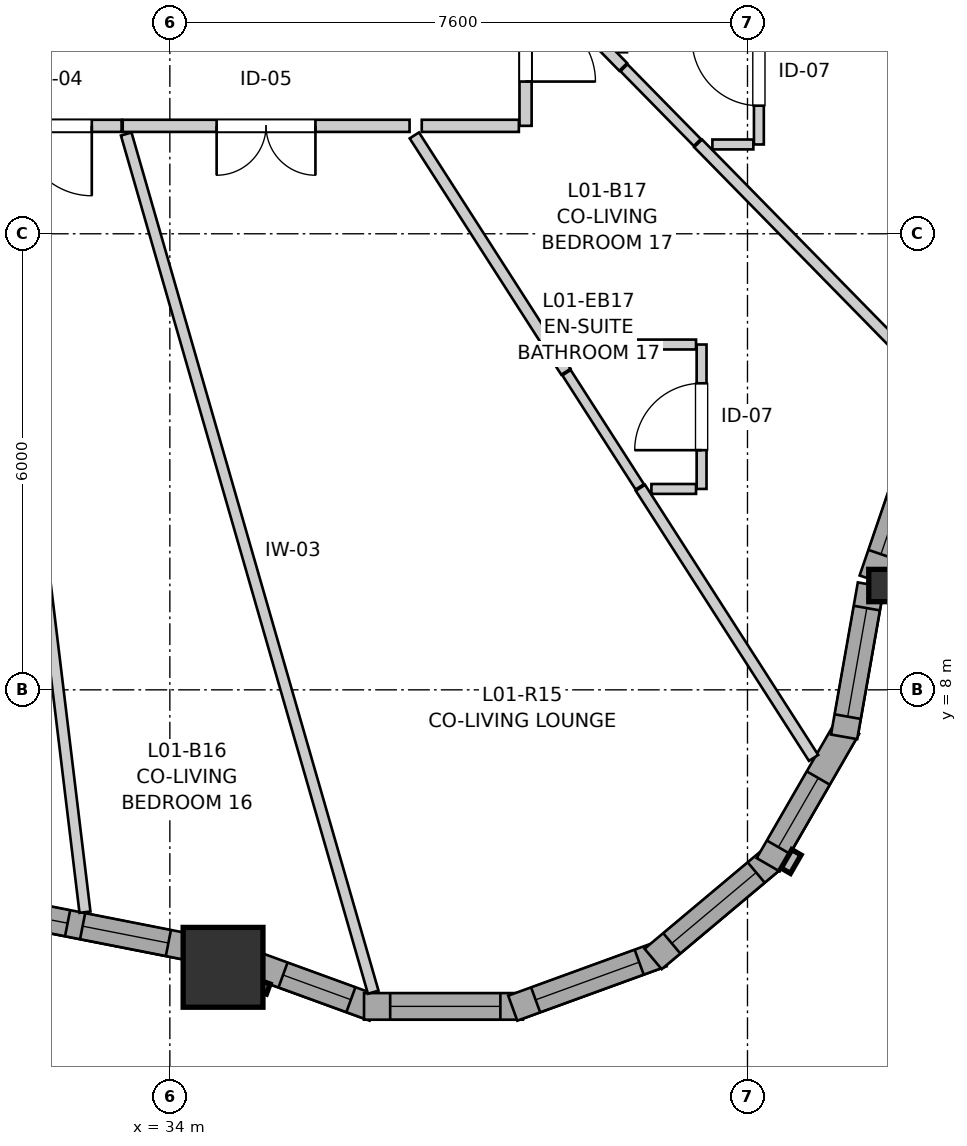
"""IFC4 building model, lengths in metres.
Left out: names, types, materials, properties, quantities, classifications, styles, units other than length and angle.
Written with IfcOpenShell. Run it as: python <this file> out.ifc"""

import sys

from ifc_helpers import new_model, si_unit, direction, frame, frame_2d, origin, origin_2d, place, context, subcontext, project, spatial, rectangle, i_section, extrude, source, transform, mapped, element, fill, save


model = new_model("IFC4")
c1 = context("Model", 3, precision=1e-05, world=origin(), true_north=direction((0.0, 1.0)))
c2 = subcontext(c1, "Body", "Model", "MODEL_VIEW")
j1 = project(units=[si_unit("LENGTHUNIT", "METRE"), si_unit("PLANEANGLEUNIT", "RADIAN")], contexts=[c1])
p1 = place(None, origin())
s1 = spatial("IfcSite", under=j1, at=p1, CompositionType="ELEMENT")
p2 = place(p1, origin())
s2 = spatial("IfcBuilding", under=s1, at=p2, CompositionType="ELEMENT")
p3 = place(p2, frame((0.0, 0.0, 7.8)))
s3 = spatial("IfcBuildingStorey", under=s2, at=p3, CompositionType="ELEMENT", Elevation=7.8)
m1 = source(origin(), c2, "Body", "SweptSolid", [
    extrude(rectangle(XDim=1.05, YDim=1.05, at=origin_2d()), origin(), (0.0, 0.0, 1.0), 2.94),
])
p4 = place(p3, frame((34.7, 4.349, 0.0), z_axis=(0.0, 0.0, 1.0), x_axis=(1.0, 0.0, 0.0)))
e1 = element("IfcColumn", 1, at=p4, inside=s3, PredefinedType="COLUMN", context=c2, shape_type="MappedRepresentation", body=[
    mapped(m1, transform((0.0, 0.0, 0.0), x_axis=(1.0, 0.0, 0.0), y_axis=(0.0, 1.0, 0.0), z_axis=(0.0, 0.0, 1.0), scale=1.0)),
])
m2 = source(origin(), c2, "Body", "SweptSolid", [
    extrude(i_section(OverallWidth=0.409, OverallDepth=0.425, WebThickness=0.03, FlangeThickness=0.048, FilletRadius=0.015, at=origin_2d()), origin(), (0.0, 0.0, 1.0), 2.94),
])
p5 = place(p3, frame((43.4, 9.372, 0.0), z_axis=(0.0, 0.0, 1.0), x_axis=(1.0, 0.0, 0.0)))
e2 = element("IfcColumn", 2, at=p5, inside=s3, PredefinedType="PILASTER", context=c2, shape_type="MappedRepresentation", body=[
    mapped(m2, transform((0.0, 0.0, 0.0), x_axis=(1.0, 0.0, 0.0), y_axis=(0.0, 1.0, 0.0), z_axis=(0.0, 0.0, 1.0), scale=1.0)),
])
p6 = place(p3, frame((31.248, 5.206, 0.0), z_axis=(0.0, 0.0, 1.0), x_axis=(0.981233354077, -0.192824025597, 0.0)))
e3 = element("IfcWall", 3, at=p6, inside=s3, PredefinedType="SOLIDWALL", context=c2, shape_type="SweptSolid", body=[
    extrude(rectangle(XDim=3.253, YDim=0.35, at=frame_2d((1.626, 0.0))), origin(), (0.0, 0.0, 1.0), 2.42),
])
p7 = place(p6, frame((0.284, 0.0, 0.82)))
e4 = element("IfcOpeningElement", 4, at=p7, cuts=e3, PredefinedType="OPENING", context=c2, shape_type="SweptSolid", body=[
    extrude(rectangle(XDim=1.15, YDim=1.2, at=frame_2d((0.575, 0.6))), frame((0.0, 0.185, 0.0), z_axis=(0.0, -1.0, 0.0), x_axis=(1.0, 0.0, 0.0)), (0.0, 0.0, 1.0), 0.37),
])
p8 = place(p6, frame((1.635, 0.0, 0.82)))
e5 = element("IfcOpeningElement", 5, at=p8, cuts=e3, PredefinedType="OPENING", context=c2, shape_type="SweptSolid", body=[
    extrude(rectangle(XDim=1.15, YDim=1.2, at=frame_2d((0.575, 0.6))), frame((0.0, 0.185, 0.0), z_axis=(0.0, -1.0, 0.0), x_axis=(1.0, 0.0, 0.0)), (0.0, 0.0, 1.0), 0.37),
])
p9 = place(p3, frame((35.042, 4.411, 0.0), z_axis=(0.0, 0.0, 1.0), x_axis=(0.9396916908, -0.34202269843, 0.0)))
e6 = element("IfcWall", 6, at=p9, inside=s3, PredefinedType="SOLIDWALL", context=c2, shape_type="SweptSolid", body=[
    extrude(rectangle(XDim=1.752, YDim=0.35, at=frame_2d((0.876, 0.0))), origin(), (0.0, 0.0, 1.0), 2.42),
])
p10 = place(p9, frame((0.476, 0.0, 0.82)))
e7 = element("IfcOpeningElement", 7, at=p10, cuts=e6, PredefinedType="OPENING", context=c2, shape_type="SweptSolid", body=[
    extrude(rectangle(XDim=0.95, YDim=1.35, at=frame_2d((0.475, 0.675))), frame((0.0, 0.185, 0.0), z_axis=(0.0, -1.0, 0.0), x_axis=(1.0, 0.0, 0.0)), (0.0, 0.0, 1.0), 0.37),
])
p11 = place(p3, frame((36.555, 3.835, 0.0), z_axis=(0.0, 0.0, 1.0), x_axis=(1.0, 0.0, 0.0)))
e8 = element("IfcWall", 8, at=p11, inside=s3, PredefinedType="SOLIDWALL", context=c2, shape_type="SweptSolid", body=[
    extrude(rectangle(XDim=2.091, YDim=0.35, at=frame_2d((1.045, 0.0))), origin(), (0.0, 0.0, 1.0), 2.42),
])
p12 = place(p11, frame((0.344, 0.0, 0.82)))
e9 = element("IfcOpeningElement", 9, at=p12, cuts=e8, PredefinedType="OPENING", context=c2, shape_type="SweptSolid", body=[
    extrude(rectangle(XDim=1.45, YDim=1.25, at=frame_2d((0.725, 0.625))), frame((0.0, 0.185, 0.0), z_axis=(0.0, -1.0, 0.0), x_axis=(1.0, 0.0, 0.0)), (0.0, 0.0, 1.0), 0.37),
])
p13 = place(p3, frame((38.512, 3.812, 0.0), z_axis=(0.0, 0.0, 1.0), x_axis=(0.939660353162, 0.342108784886, 0.0)))
e10 = element("IfcWall", 10, at=p13, inside=s3, PredefinedType="SOLIDWALL", context=c2, shape_type="SweptSolid", body=[
    extrude(rectangle(XDim=2.09, YDim=0.35, at=frame_2d((1.045, 0.0))), origin(), (0.0, 0.0, 1.0), 2.42),
])
p14 = place(p13, frame((0.32, 0.0, 0.82)))
e11 = element("IfcOpeningElement", 11, at=p14, cuts=e10, PredefinedType="OPENING", context=c2, shape_type="SweptSolid", body=[
    extrude(rectangle(XDim=1.45, YDim=1.25, at=frame_2d((0.725, 0.625))), frame((0.0, 0.185, 0.0), z_axis=(0.0, -1.0, 0.0), x_axis=(1.0, 0.0, 0.0)), (0.0, 0.0, 1.0), 0.37),
])
p15 = place(p3, frame((40.358, 4.459, 0.0), z_axis=(0.0, 0.0, 1.0), x_axis=(0.766082082368, 0.642742750308, 0.0)))
e12 = element("IfcWall", 12, at=p15, inside=s3, PredefinedType="SOLIDWALL", context=c2, shape_type="SweptSolid", body=[
    extrude(rectangle(XDim=2.09, YDim=0.35, at=frame_2d((1.045, 0.0))), origin(), (0.0, 0.0, 1.0), 2.42),
])
p16 = place(p15, frame((0.32, 0.0, 0.82)))
e13 = element("IfcOpeningElement", 13, at=p16, cuts=e12, PredefinedType="OPENING", context=c2, shape_type="SweptSolid", body=[
    extrude(rectangle(XDim=1.45, YDim=1.25, at=frame_2d((0.725, 0.625))), frame((0.0, 0.185, 0.0), z_axis=(0.0, -1.0, 0.0), x_axis=(1.0, 0.0, 0.0)), (0.0, 0.0, 1.0), 0.37),
])
p17 = place(p3, frame((41.873, 5.699, 0.0), z_axis=(0.0, 0.0, 1.0), x_axis=(0.49990781971, 0.866078617559, 0.0)))
e14 = element("IfcWall", 14, at=p17, inside=s3, PredefinedType="SOLIDWALL", context=c2, shape_type="SweptSolid", body=[
    extrude(rectangle(XDim=2.09, YDim=0.35, at=frame_2d((1.045, 0.0))), origin(), (0.0, 0.0, 1.0), 2.42),
])
p18 = place(p17, frame((0.268, 0.0, 0.82)))
e15 = element("IfcOpeningElement", 15, at=p18, cuts=e14, PredefinedType="OPENING", context=c2, shape_type="SweptSolid", body=[
    extrude(rectangle(XDim=1.05, YDim=1.45, at=frame_2d((0.525, 0.725))), frame((0.0, 0.185, 0.0), z_axis=(0.0, -1.0, 0.0), x_axis=(1.0, 0.0, 0.0)), (0.0, 0.0, 1.0), 0.37),
])
p19 = place(p3, frame((42.871, 7.382, 0.0), z_axis=(0.0, 0.0, 1.0), x_axis=(0.173586593252, 0.984818610021, 0.0)))
e16 = element("IfcWall", 16, at=p19, inside=s3, PredefinedType="SOLIDWALL", context=c2, shape_type="SweptSolid", body=[
    extrude(rectangle(XDim=2.032, YDim=0.35, at=frame_2d((1.016, 0.0))), origin(), (0.0, 0.0, 1.0), 2.42),
])
p20 = place(p19, frame((0.27, 0.0, 0.82)))
e17 = element("IfcOpeningElement", 17, at=p20, cuts=e16, PredefinedType="OPENING", context=c2, shape_type="SweptSolid", body=[
    extrude(rectangle(XDim=1.45, YDim=1.25, at=frame_2d((0.725, 0.625))), frame((0.0, 0.185, 0.0), z_axis=(0.0, -1.0, 0.0), x_axis=(1.0, 0.0, 0.0)), (0.0, 0.0, 1.0), 0.37),
])
p21 = place(p3, frame((43.241, 9.448, 0.0), z_axis=(0.0, 0.0, 1.0), x_axis=(0.323599751171, 0.946194060984, 0.0)))
e18 = element("IfcWall", 18, at=p21, inside=s3, PredefinedType="SOLIDWALL", context=c2, shape_type="SweptSolid", body=[
    extrude(rectangle(XDim=3.532, YDim=0.35, at=frame_2d((1.766, 0.0))), origin(), (0.0, 0.0, 1.0), 2.42),
])
p22 = place(p21, frame((0.356, 0.0, 0.82)))
e19 = element("IfcOpeningElement", 19, at=p22, cuts=e18, PredefinedType="OPENING", context=c2, shape_type="SweptSolid", body=[
    extrude(rectangle(XDim=2.1, YDim=1.4, at=frame_2d((1.05, 0.7))), frame((0.0, 0.185, 0.0), z_axis=(0.0, -1.0, 0.0), x_axis=(1.0, 0.0, 0.0)), (0.0, 0.0, 1.0), 0.37),
])
p23 = place(p3, frame((37.154, 15.42, 0.0), z_axis=(0.0, 0.0, 1.0), x_axis=(-1.0, 0.0, 0.0)))
e20 = element("IfcWall", 20, at=p23, inside=s3, PredefinedType="PARTITIONING", context=c2, shape_type="SweptSolid", body=[
    extrude(rectangle(XDim=3.774, YDim=0.16, at=frame_2d((1.887, 0.0))), origin(), (0.0, 0.0, 1.0), 2.94),
])
p24 = place(p23, frame((1.239, 0.0, 0.0)))
e21 = element("IfcOpeningElement", 21, at=p24, cuts=e20, PredefinedType="OPENING", context=c2, shape_type="SweptSolid", body=[
    extrude(rectangle(XDim=1.3, YDim=2.1, at=frame_2d((0.65, 1.05))), frame((0.0, 0.09, 0.0), z_axis=(0.0, -1.0, 0.0), x_axis=(1.0, 0.0, 0.0)), (0.0, 0.0, 1.0), 0.18),
])
p25 = place(p3, frame((38.68, 17.469, 0.0), z_axis=(0.0, 0.0, 1.0), x_axis=(0.0, -1.0, 0.0)))
e22 = element("IfcWall", 22, at=p25, inside=s3, PredefinedType="PARTITIONING", context=c2, shape_type="SweptSolid", body=[
    extrude(rectangle(XDim=2.049, YDim=0.16, at=frame_2d((1.024, 0.0))), origin(), (0.0, 0.0, 1.0), 2.94),
])
p26 = place(p25, frame((0.546, 0.0, 0.0)))
e23 = element("IfcOpeningElement", 23, at=p26, cuts=e22, PredefinedType="OPENING", context=c2, shape_type="SweptSolid", body=[
    extrude(rectangle(XDim=0.92, YDim=2.1, at=frame_2d((0.46, 1.05))), frame((0.0, 0.09, 0.0), z_axis=(0.0, -1.0, 0.0), x_axis=(1.0, 0.0, 0.0)), (0.0, 0.0, 1.0), 0.18),
])
p27 = place(p3, frame((40.996, 10.643, 0.0), z_axis=(0.0, 0.0, 1.0), x_axis=(0.0, 1.0, 0.0)))
e24 = element("IfcWall", 24, at=p27, inside=s3, PredefinedType="PARTITIONING", context=c2, shape_type="SweptSolid", body=[
    extrude(rectangle(XDim=1.9, YDim=0.13, at=frame_2d((0.95, 0.0))), origin(), (0.0, 0.0, 1.0), 2.94),
])
p28 = place(p27, frame((0.51, 0.0, 0.0)))
e25 = element("IfcOpeningElement", 25, at=p28, cuts=e24, PredefinedType="OPENING", context=c2, shape_type="SweptSolid", body=[
    extrude(rectangle(XDim=0.88, YDim=2.05, at=frame_2d((0.44, 1.025))), frame((0.0, 0.075, 0.0), z_axis=(0.0, -1.0, 0.0), x_axis=(1.0, 0.0, 0.0)), (0.0, 0.0, 1.0), 0.15),
])
p29 = place(p3, frame((41.75, 15.175, 0.0), z_axis=(0.0, 0.0, 1.0), x_axis=(0.0, 1.0, 0.0)))
e26 = element("IfcWall", 26, at=p29, inside=s3, PredefinedType="PARTITIONING", context=c2, shape_type="SweptSolid", body=[
    extrude(rectangle(XDim=1.9, YDim=0.13, at=frame_2d((0.95, 0.0))), origin(), (0.0, 0.0, 1.0), 2.94),
])
p30 = place(p29, frame((0.51, 0.0, 0.0)))
e27 = element("IfcOpeningElement", 27, at=p30, cuts=e26, PredefinedType="OPENING", context=c2, shape_type="SweptSolid", body=[
    extrude(rectangle(XDim=0.88, YDim=2.05, at=frame_2d((0.44, 1.025))), frame((0.0, 0.075, 0.0), z_axis=(0.0, -1.0, 0.0), x_axis=(1.0, 0.0, 0.0)), (0.0, 0.0, 1.0), 0.15),
])
p31 = place(p3, frame((33.365, 15.42, 0.0), z_axis=(0.0, 0.0, 1.0), x_axis=(-1.0, 0.0, 0.0)))
e28 = element("IfcWall", 28, at=p31, inside=s3, PredefinedType="PARTITIONING", context=c2, shape_type="SweptSolid", body=[
    extrude(rectangle(XDim=1.704, YDim=0.16, at=frame_2d((0.852, 0.0))), origin(), (0.0, 0.0, 1.0), 2.94),
])
p32 = place(p31, frame((0.392, 0.0, 0.0)))
e29 = element("IfcOpeningElement", 29, at=p32, cuts=e28, PredefinedType="OPENING", context=c2, shape_type="SweptSolid", body=[
    extrude(rectangle(XDim=0.92, YDim=2.1, at=frame_2d((0.46, 1.05))), frame((0.0, 0.09, 0.0), z_axis=(0.0, -1.0, 0.0), x_axis=(1.0, 0.0, 0.0)), (0.0, 0.0, 1.0), 0.18),
])
p33 = place(p3, frame((33.426, 15.312, 0.0), z_axis=(0.0, 0.0, 1.0), x_axis=(0.276606114731, -0.960983380342, 0.0)))
e30 = element("IfcWall", 30, at=p33, inside=s3, PredefinedType="PARTITIONING", context=c2, shape_type="SweptSolid", body=[
    extrude(rectangle(XDim=11.749, YDim=0.145, at=frame_2d((5.875, 0.0))), origin(), (0.0, 0.0, 1.0), 2.94),
])
p34 = place(p3, frame((31.643, 15.323, 0.0), z_axis=(0.0, 0.0, 1.0), x_axis=(0.120185874717, -0.992751406707, 0.0)))
e31 = element("IfcWall", 31, at=p34, inside=s3, PredefinedType="PARTITIONING", context=c2, shape_type="SweptSolid", body=[
    extrude(rectangle(XDim=10.323, YDim=0.145, at=frame_2d((5.162, 0.0))), origin(), (0.0, 0.0, 1.0), 2.94),
])
p35 = place(p3, frame((40.95, 15.19, 0.0), z_axis=(0.0, 0.0, 1.0), x_axis=(0.700142401903, -0.714003233226, 0.0)))
e32 = element("IfcWall", 32, at=p35, inside=s3, PredefinedType="PARTITIONING", context=c2, shape_type="SweptSolid", body=[
    extrude(rectangle(XDim=4.298, YDim=0.145, at=frame_2d((2.149, 0.0))), origin(), (0.0, 0.0, 1.0), 2.94),
])
p36 = place(p3, frame((40.191, 10.658, 0.0), z_axis=(0.0, 0.0, 1.0), x_axis=(0.539757550566, -0.841820519236, 0.0)))
e33 = element("IfcWall", 33, at=p36, inside=s3, PredefinedType="PARTITIONING", context=c2, shape_type="SweptSolid", body=[
    extrude(rectangle(XDim=4.221, YDim=0.145, at=frame_2d((2.111, 0.0))), origin(), (0.0, 0.0, 1.0), 2.94),
])
p37 = place(p3, frame((37.217, 15.294, 0.0), z_axis=(0.0, 0.0, 1.0), x_axis=(0.539878709929, -0.841742822105, 0.0)))
e34 = element("IfcWall", 34, at=p37, inside=s3, PredefinedType="PARTITIONING", context=c2, shape_type="SweptSolid", body=[
    extrude(rectangle(XDim=3.694, YDim=0.145, at=frame_2d((1.847, 0.0))), origin(), (0.0, 0.0, 1.0), 2.94),
])
p38 = place(p3, frame((38.817, 17.365, 0.0), z_axis=(0.0, 0.0, 1.0), x_axis=(0.70029627305, -0.713852316626, 0.0)))
e35 = element("IfcWall", 35, at=p38, inside=s3, PredefinedType="PARTITIONING", context=c2, shape_type="SweptSolid", body=[
    extrude(rectangle(XDim=1.639, YDim=0.145, at=frame_2d((0.819, 0.0))), origin(), (0.0, 0.0, 1.0), 2.94),
])
p39 = place(p3, frame((39.196, 12.543, 0.0), z_axis=(0.0, 0.0, 1.0), x_axis=(1.0, 0.0, 0.0)))
e36 = element("IfcWall", 36, at=p39, inside=s3, PredefinedType="PARTITIONING", context=c2, shape_type="SweptSolid", body=[
    extrude(rectangle(XDim=1.727, YDim=0.13, at=frame_2d((0.864, 0.0))), origin(), (0.0, 0.0, 1.0), 2.94),
])
p40 = place(p3, frame((39.219, 12.172, 0.0), z_axis=(0.0, 0.0, 1.0), x_axis=(0.539899826285, -0.84172927808, 0.0)))
e37 = element("IfcWall", 37, at=p40, inside=s3, PredefinedType="PARTITIONING", context=c2, shape_type="SweptSolid", body=[
    extrude(rectangle(XDim=1.784, YDim=0.13, at=frame_2d((0.892, 0.0))), origin(), (0.0, 0.0, 1.0), 2.94),
])
p41 = place(p3, frame((37.314, 15.42, 0.0), z_axis=(0.0, 0.0, 1.0), x_axis=(1.0, 0.0, 0.0)))
e38 = element("IfcWall", 38, at=p41, inside=s3, PredefinedType="PARTITIONING", context=c2, shape_type="SweptSolid", body=[
    extrude(rectangle(XDim=1.278, YDim=0.16, at=frame_2d((0.639, 0.0))), origin(), (0.0, 0.0, 1.0), 2.94),
])
p42 = place(p3, frame((39.975, 16.184, 0.0), z_axis=(0.0, 0.0, 1.0), x_axis=(0.700338966049, -0.713810431861, 0.0)))
e39 = element("IfcWall", 39, at=p42, inside=s3, PredefinedType="PARTITIONING", context=c2, shape_type="SweptSolid", body=[
    extrude(rectangle(XDim=1.377, YDim=0.13, at=frame_2d((0.689, 0.0))), origin(), (0.0, 0.0, 1.0), 2.94),
])
p43 = place(p3, frame((40.336, 10.643, 0.0), z_axis=(0.0, 0.0, 1.0), x_axis=(1.0, 0.0, 0.0)))
e40 = element("IfcWall", 40, at=p43, inside=s3, PredefinedType="PARTITIONING", context=c2, shape_type="SweptSolid", body=[
    extrude(rectangle(XDim=0.587, YDim=0.13, at=frame_2d((0.294, 0.0))), origin(), (0.0, 0.0, 1.0), 2.94),
])
p44 = place(p3, frame((41.138, 15.175, 0.0), z_axis=(0.0, 0.0, 1.0), x_axis=(1.0, 0.0, 0.0)))
e41 = element("IfcWall", 41, at=p44, inside=s3, PredefinedType="PARTITIONING", context=c2, shape_type="SweptSolid", body=[
    extrude(rectangle(XDim=0.539, YDim=0.13, at=frame_2d((0.27, 0.0))), origin(), (0.0, 0.0, 1.0), 2.94),
])
m3 = source(origin(), c2, "Body", "SweptSolid", [
    extrude(rectangle(XDim=1.15, YDim=1.2, at=frame_2d((0.575, 0.6))), frame((0.0, 0.03, 0.0), z_axis=(0.0, -1.0, 0.0), x_axis=(1.0, 0.0, 0.0)), (0.0, 0.0, 1.0), 0.06),
])
p45 = place(p7, origin())
e42 = element("IfcWindow", 42, at=p45, inside=s3, PartitioningType="SINGLE_PANEL", PredefinedType="WINDOW", context=c2, shape_type="MappedRepresentation", body=[
    mapped(m3, transform((0.0, 0.0, 0.0), x_axis=(1.0, 0.0, 0.0), y_axis=(0.0, 1.0, 0.0), z_axis=(0.0, 0.0, 1.0), scale=1.0)),
])
fill(e4, e42)
p46 = place(p8, origin())
e43 = element("IfcWindow", 43, at=p46, inside=s3, PartitioningType="SINGLE_PANEL", PredefinedType="WINDOW", context=c2, shape_type="MappedRepresentation", body=[
    mapped(m3, transform((0.0, 0.0, 0.0), x_axis=(1.0, 0.0, 0.0), y_axis=(0.0, 1.0, 0.0), z_axis=(0.0, 0.0, 1.0), scale=1.0)),
])
fill(e5, e43)
m4 = source(origin(), c2, "Body", "SweptSolid", [
    extrude(rectangle(XDim=0.95, YDim=1.35, at=frame_2d((0.475, 0.675))), frame((0.0, 0.03, 0.0), z_axis=(0.0, -1.0, 0.0), x_axis=(1.0, 0.0, 0.0)), (0.0, 0.0, 1.0), 0.06),
])
p47 = place(p10, origin())
e44 = element("IfcWindow", 44, at=p47, inside=s3, PartitioningType="SINGLE_PANEL", PredefinedType="WINDOW", context=c2, shape_type="MappedRepresentation", body=[
    mapped(m4, transform((0.0, 0.0, 0.0), x_axis=(1.0, 0.0, 0.0), y_axis=(0.0, 1.0, 0.0), z_axis=(0.0, 0.0, 1.0), scale=1.0)),
])
fill(e7, e44)
m5 = source(origin(), c2, "Body", "SweptSolid", [
    extrude(rectangle(XDim=1.45, YDim=1.25, at=frame_2d((0.725, 0.625))), frame((0.0, 0.03, 0.0), z_axis=(0.0, -1.0, 0.0), x_axis=(1.0, 0.0, 0.0)), (0.0, 0.0, 1.0), 0.06),
])
p48 = place(p12, origin())
e45 = element("IfcWindow", 45, at=p48, inside=s3, PartitioningType="SINGLE_PANEL", PredefinedType="WINDOW", context=c2, shape_type="MappedRepresentation", body=[
    mapped(m5, transform((0.0, 0.0, 0.0), x_axis=(1.0, 0.0, 0.0), y_axis=(0.0, 1.0, 0.0), z_axis=(0.0, 0.0, 1.0), scale=1.0)),
])
fill(e9, e45)
p49 = place(p14, origin())
e46 = element("IfcWindow", 46, at=p49, inside=s3, PartitioningType="SINGLE_PANEL", PredefinedType="WINDOW", context=c2, shape_type="MappedRepresentation", body=[
    mapped(m5, transform((0.0, 0.0, 0.0), x_axis=(1.0, 0.0, 0.0), y_axis=(0.0, 1.0, 0.0), z_axis=(0.0, 0.0, 1.0), scale=1.0)),
])
fill(e11, e46)
p50 = place(p16, origin())
e47 = element("IfcWindow", 47, at=p50, inside=s3, PartitioningType="SINGLE_PANEL", PredefinedType="WINDOW", context=c2, shape_type="MappedRepresentation", body=[
    mapped(m5, transform((0.0, 0.0, 0.0), x_axis=(1.0, 0.0, 0.0), y_axis=(0.0, 1.0, 0.0), z_axis=(0.0, 0.0, 1.0), scale=1.0)),
])
fill(e13, e47)
m6 = source(origin(), c2, "Body", "SweptSolid", [
    extrude(rectangle(XDim=1.05, YDim=1.45, at=frame_2d((0.525, 0.725))), frame((0.0, 0.03, 0.0), z_axis=(0.0, -1.0, 0.0), x_axis=(1.0, 0.0, 0.0)), (0.0, 0.0, 1.0), 0.06),
])
p51 = place(p18, origin())
e48 = element("IfcWindow", 48, at=p51, inside=s3, PartitioningType="SINGLE_PANEL", PredefinedType="WINDOW", context=c2, shape_type="MappedRepresentation", body=[
    mapped(m6, transform((0.0, 0.0, 0.0), x_axis=(1.0, 0.0, 0.0), y_axis=(0.0, 1.0, 0.0), z_axis=(0.0, 0.0, 1.0), scale=1.0)),
])
fill(e15, e48)
p52 = place(p20, origin())
e49 = element("IfcWindow", 49, at=p52, inside=s3, PartitioningType="SINGLE_PANEL", PredefinedType="WINDOW", context=c2, shape_type="MappedRepresentation", body=[
    mapped(m5, transform((0.0, 0.0, 0.0), x_axis=(1.0, 0.0, 0.0), y_axis=(0.0, 1.0, 0.0), z_axis=(0.0, 0.0, 1.0), scale=1.0)),
])
fill(e17, e49)
m7 = source(origin(), c2, "Body", "SweptSolid", [
    extrude(rectangle(XDim=2.1, YDim=1.4, at=frame_2d((1.05, 0.7))), frame((0.0, 0.03, 0.0), z_axis=(0.0, -1.0, 0.0), x_axis=(1.0, 0.0, 0.0)), (0.0, 0.0, 1.0), 0.06),
])
p53 = place(p22, origin())
e50 = element("IfcWindow", 50, at=p53, inside=s3, PartitioningType="SINGLE_PANEL", PredefinedType="WINDOW", context=c2, shape_type="MappedRepresentation", body=[
    mapped(m7, transform((0.0, 0.0, 0.0), x_axis=(1.0, 0.0, 0.0), y_axis=(0.0, 1.0, 0.0), z_axis=(0.0, 0.0, 1.0), scale=1.0)),
])
fill(e19, e50)
m8 = source(origin(), c2, "Body", "SweptSolid", [
    extrude(rectangle(XDim=1.3, YDim=2.1, at=frame_2d((0.65, 1.05))), frame((0.0, 0.025, 0.0), z_axis=(0.0, -1.0, 0.0), x_axis=(1.0, 0.0, 0.0)), (0.0, 0.0, 1.0), 0.05),
])
p54 = place(p24, origin())
e51 = element("IfcDoor", 51, at=p54, inside=s3, OperationType="DOUBLE_DOOR_SINGLE_SWING", PredefinedType="DOOR", context=c2, shape_type="MappedRepresentation", body=[
    mapped(m8, transform((0.0, 0.0, 0.0), x_axis=(1.0, 0.0, 0.0), y_axis=(0.0, 1.0, 0.0), z_axis=(0.0, 0.0, 1.0), scale=1.0)),
])
fill(e21, e51)
m9 = source(origin(), c2, "Body", "SweptSolid", [
    extrude(rectangle(XDim=0.92, YDim=2.1, at=frame_2d((0.46, 1.05))), frame((0.0, 0.025, 0.0), z_axis=(0.0, -1.0, 0.0), x_axis=(1.0, 0.0, 0.0)), (0.0, 0.0, 1.0), 0.05),
])
p55 = place(p26, origin())
e52 = element("IfcDoor", 52, at=p55, inside=s3, OperationType="SINGLE_SWING_RIGHT", PredefinedType="DOOR", context=c2, shape_type="MappedRepresentation", body=[
    mapped(m9, transform((0.0, 0.0, 0.0), x_axis=(1.0, 0.0, 0.0), y_axis=(0.0, 1.0, 0.0), z_axis=(0.0, 0.0, 1.0), scale=1.0)),
])
fill(e23, e52)
m10 = source(origin(), c2, "Body", "SweptSolid", [
    extrude(rectangle(XDim=0.88, YDim=2.05, at=frame_2d((0.44, 1.025))), frame((0.0, 0.025, 0.0), z_axis=(0.0, -1.0, 0.0), x_axis=(1.0, 0.0, 0.0)), (0.0, 0.0, 1.0), 0.05),
])
p56 = place(p28, origin())
e53 = element("IfcDoor", 53, at=p56, inside=s3, OperationType="SINGLE_SWING_LEFT", PredefinedType="DOOR", context=c2, shape_type="MappedRepresentation", body=[
    mapped(m10, transform((0.0, 0.0, 0.0), x_axis=(1.0, 0.0, 0.0), y_axis=(0.0, 1.0, 0.0), z_axis=(0.0, 0.0, 1.0), scale=1.0)),
])
fill(e25, e53)
p57 = place(p30, origin())
e54 = element("IfcDoor", 54, at=p57, inside=s3, OperationType="SINGLE_SWING_RIGHT", PredefinedType="DOOR", context=c2, shape_type="MappedRepresentation", body=[
    mapped(m10, transform((0.0, 0.0, 0.0), x_axis=(1.0, 0.0, 0.0), y_axis=(0.0, 1.0, 0.0), z_axis=(0.0, 0.0, 1.0), scale=1.0)),
])
fill(e27, e54)
p58 = place(p32, origin())
e55 = element("IfcDoor", 55, at=p58, inside=s3, OperationType="SINGLE_SWING_LEFT", PredefinedType="DOOR", context=c2, shape_type="MappedRepresentation", body=[
    mapped(m9, transform((0.0, 0.0, 0.0), x_axis=(1.0, 0.0, 0.0), y_axis=(0.0, 1.0, 0.0), z_axis=(0.0, 0.0, 1.0), scale=1.0)),
])
fill(e29, e55)
save(model, sys.argv[1])
